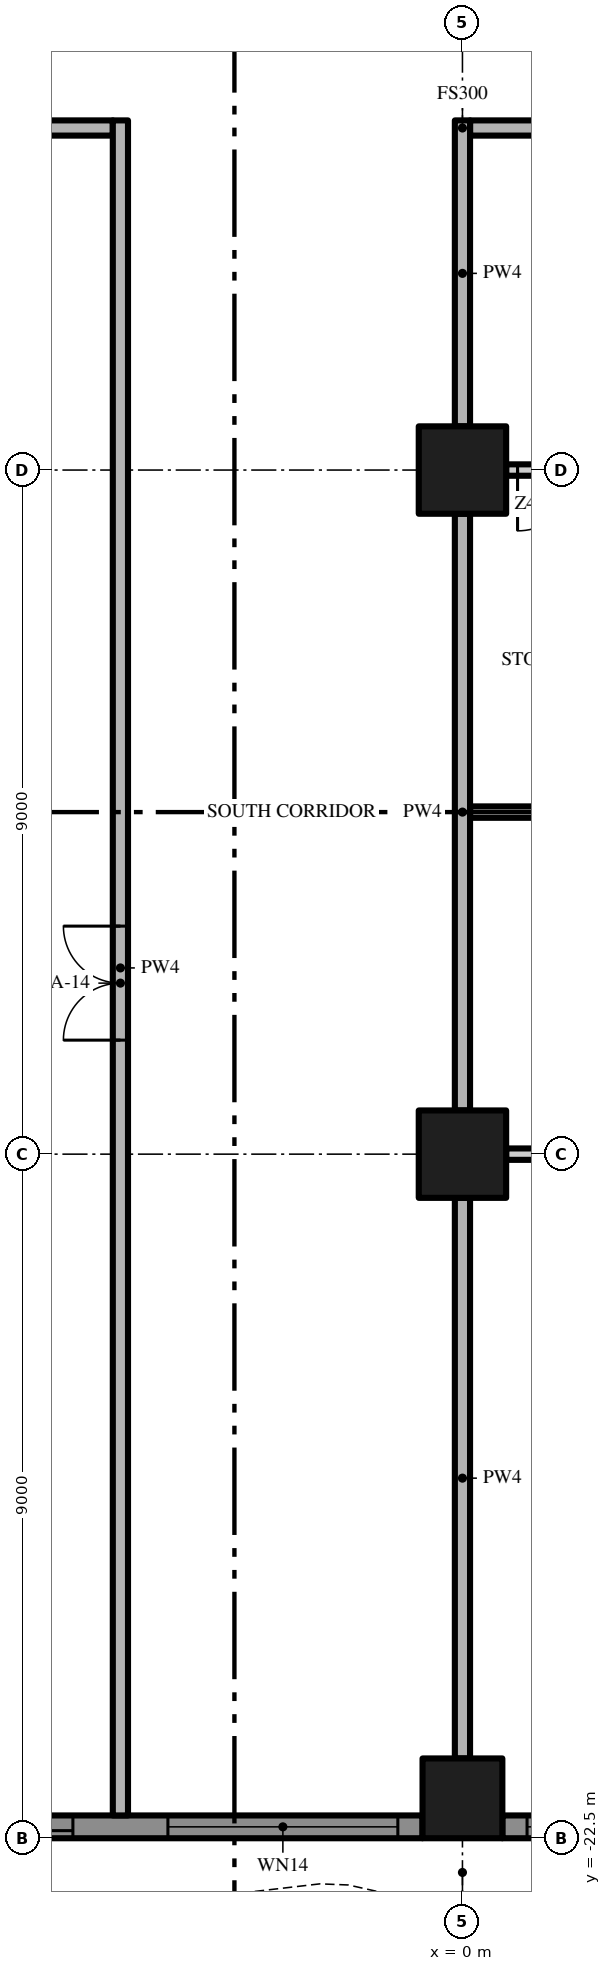
"""IFC4 building model, lengths in metres.
Left out: names, types, materials, properties, quantities, classifications, styles, units other than length and angle.
Written with IfcOpenShell. Run it as: python <this file> out.ifc"""

import sys

from ifc_helpers import new_model, si_unit, direction, frame, frame_2d, origin, origin_2d, place, context, subcontext, project, spatial, polyline, rectangle, outline, extrude, element, fill, save


model = new_model("IFC4")
c1 = context("Model", 3, precision=1e-05, world=origin(), true_north=direction((0.0, 1.0)))
c2 = subcontext(c1, "Body", "Model", "MODEL_VIEW")
j1 = project(units=[si_unit("LENGTHUNIT", "METRE"), si_unit("PLANEANGLEUNIT", "RADIAN")], contexts=[c1])
p1 = place(None, origin())
s1 = spatial("IfcSite", under=j1, at=p1, CompositionType="ELEMENT")
p2 = place(p1, origin())
s2 = spatial("IfcBuilding", under=s1, at=p2, CompositionType="ELEMENT")
p3 = place(p2, frame((0.0, 0.0, 192.0)))
s3 = spatial("IfcBuildingStorey", under=s2, at=p3, CompositionType="ELEMENT", Elevation=192.0)
p4 = place(p3, frame((0.0, -13.5, 0.0), z_axis=(0.0, 0.0, 1.0), x_axis=(1.0, 0.0, 0.0)))
e1 = element("IfcColumn", 1, at=p4, inside=s3, PredefinedType="COLUMN", context=c2, shape_type="SweptSolid", body=[
    extrude(rectangle(XDim=1.15, YDim=1.15, at=origin_2d()), origin(), (0.0, 0.0, 1.0), 3.5),
])
p5 = place(p3, frame((0.0, -21.975, 0.0), z_axis=(0.0, 0.0, 1.0), x_axis=(1.0, 0.0, 0.0)))
e2 = element("IfcColumn", 2, at=p5, inside=s3, PredefinedType="COLUMN", context=c2, shape_type="SweptSolid", body=[
    extrude(rectangle(XDim=1.05, YDim=1.05, at=origin_2d()), origin(), (0.0, 0.0, 1.0), 3.5),
])
p6 = place(p3, frame((0.0, -4.5, 0.0), z_axis=(0.0, 0.0, 1.0), x_axis=(1.0, 0.0, 0.0)))
e3 = element("IfcColumn", 3, at=p6, inside=s3, PredefinedType="COLUMN", context=c2, shape_type="SweptSolid", body=[
    extrude(rectangle(XDim=1.15, YDim=1.15, at=origin_2d()), origin(), (0.0, 0.0, 1.0), 3.5),
])
p7 = place(p3, frame((-0.525, -22.35, 0.0), z_axis=(0.0, 0.0, 1.0), x_axis=(-1.0, 0.0, 0.0)))
e4 = element("IfcWall", 4, at=p7, inside=s3, PredefinedType="SOLIDWALL", context=c2, shape_type="SweptSolid", body=[
    extrude(rectangle(XDim=7.95, YDim=0.3, at=frame_2d((3.975, 0.0))), origin(), (0.0, 0.0, 1.0), 3.5),
])
p8 = place(p7, frame((4.6, 0.0, 0.0)))
e5 = element("IfcOpeningElement", 5, at=p8, cuts=e4, PredefinedType="OPENING", context=c2, shape_type="SweptSolid", body=[
    extrude(rectangle(XDim=3.025, YDim=2.4, at=frame_2d((1.512, 1.2))), frame((0.0, 0.16, 0.0), z_axis=(0.0, -1.0, 0.0), x_axis=(1.0, 0.0, 0.0)), (0.0, 0.0, 1.0), 0.32),
])
p9 = place(p7, frame((0.325, 0.0, 0.45)))
e6 = element("IfcOpeningElement", 6, at=p9, cuts=e4, PredefinedType="OPENING", context=c2, shape_type="SweptSolid", body=[
    extrude(rectangle(XDim=3.025, YDim=2.65, at=frame_2d((1.512, 1.325))), frame((0.0, 0.16, 0.0), z_axis=(0.0, -1.0, 0.0), x_axis=(1.0, 0.0, 0.0)), (0.0, 0.0, 1.0), 0.32),
])
p10 = place(p3, frame((8.475, -22.35, 0.0), z_axis=(0.0, 0.0, 1.0), x_axis=(-1.0, 0.0, 0.0)))
e7 = element("IfcWall", 7, at=p10, inside=s3, PredefinedType="SOLIDWALL", context=c2, shape_type="SweptSolid", body=[
    extrude(rectangle(XDim=7.95, YDim=0.3, at=frame_2d((3.975, 0.0))), origin(), (0.0, 0.0, 1.0), 3.5),
])
p11 = place(p10, frame((4.6, 0.0, 0.45)))
e8 = element("IfcOpeningElement", 8, at=p11, cuts=e7, PredefinedType="OPENING", context=c2, shape_type="SweptSolid", body=[
    extrude(rectangle(XDim=3.025, YDim=2.65, at=frame_2d((1.512, 1.325))), frame((0.0, 0.16, 0.0), z_axis=(0.0, -1.0, 0.0), x_axis=(1.0, 0.0, 0.0)), (0.0, 0.0, 1.0), 0.32),
])
p12 = place(p10, frame((0.325, 0.0, 0.0)))
e9 = element("IfcOpeningElement", 9, at=p12, cuts=e7, PredefinedType="OPENING", context=c2, shape_type="SweptSolid", body=[
    extrude(rectangle(XDim=3.025, YDim=2.4, at=frame_2d((1.512, 1.2))), frame((0.0, 0.16, 0.0), z_axis=(0.0, -1.0, 0.0), x_axis=(1.0, 0.0, 0.0)), (0.0, 0.0, 1.0), 0.32),
])
p13 = place(p3, origin())
e10 = element("IfcWall", 10, at=p13, inside=s3, PredefinedType="USERDEFINED", context=c2, shape_type="SweptSolid", body=[
    extrude(outline(polyline([(-22.5, -25.149), (-21.0, -24.488), (-19.5, -23.755), (-18.0, -23.231), (-16.875, -23.1), (-16.5, -23.115), (-15.0, -23.451), (-13.5, -24.112), (-12.0, -24.845), (-10.5, -25.369), (-9.375, -25.5), (-9.0, -25.485), (-7.5, -25.149), (-6.0, -24.488), (-4.5, -23.755), (-3.0, -23.231), (-1.875, -23.1), (-1.5, -23.115), (0.0, -23.451), (1.5, -24.112), (3.0, -24.845), (4.5, -25.369), (5.625, -25.5), (6.0, -25.485), (7.5, -25.149), (9.0, -24.488), (10.5, -23.755), (12.0, -23.231), (13.125, -23.1), (13.5, -23.115), (15.0, -23.451), (16.5, -24.112), (18.0, -24.845), (19.5, -25.369), (20.625, -25.5), (21.0, -25.485), (22.5, -25.149), (22.445, -24.905), (20.967, -25.236), (20.635, -25.249), (19.556, -25.124), (18.096, -24.614), (16.605, -23.885), (15.079, -23.213), (13.533, -22.866), (13.115, -22.849), (11.944, -22.986), (10.404, -23.524), (8.895, -24.261), (7.421, -24.91), (5.967, -25.236), (5.635, -25.249), (4.556, -25.124), (3.096, -24.614), (1.605, -23.885), (0.079, -23.213), (-1.467, -22.866), (-1.885, -22.849), (-3.056, -22.986), (-4.596, -23.524), (-6.105, -24.261), (-7.579, -24.91), (-9.033, -25.236), (-9.365, -25.249), (-10.444, -25.124), (-11.904, -24.614), (-13.395, -23.885), (-14.921, -23.213), (-16.467, -22.866), (-16.885, -22.849), (-18.056, -22.986), (-19.596, -23.524), (-21.105, -24.261), (-22.601, -24.92), (-22.5, -25.149)])), origin(), (0.0, 0.0, 1.0), 0.9),
])
p14 = place(p3, frame((8.425, -13.5, 0.0), z_axis=(0.0, 0.0, 1.0), x_axis=(-1.0, 0.0, 0.0)))
e11 = element("IfcWall", 11, at=p14, inside=s3, PredefinedType="PARTITIONING", context=c2, shape_type="SweptSolid", body=[
    extrude(rectangle(XDim=7.85, YDim=0.15, at=frame_2d((3.925, 0.0))), origin(), (0.0, 0.0, 1.0), 3.5),
])
p15 = place(p14, frame((4.15, 0.0, 0.0)))
e12 = element("IfcOpeningElement", 12, at=p15, cuts=e11, PredefinedType="OPENING", context=c2, shape_type="SweptSolid", body=[
    extrude(rectangle(XDim=1.8, YDim=2.4, at=frame_2d((0.9, 1.2))), frame((0.0, 0.085, 0.0), z_axis=(0.0, -1.0, 0.0), x_axis=(1.0, 0.0, 0.0)), (0.0, 0.0, 1.0), 0.17),
])
p16 = place(p3, frame((0.1, -9.0, 0.0), z_axis=(0.0, 0.0, 1.0), x_axis=(1.0, 0.0, 0.0)))
e13 = element("IfcWall", 13, at=p16, inside=s3, PredefinedType="PARTITIONING", context=c2, shape_type="SweptSolid", body=[
    extrude(rectangle(XDim=13.4, YDim=0.15, at=frame_2d((6.7, 0.0))), origin(), (0.0, 0.0, 1.0), 3.5),
])
p17 = place(p16, frame((6.9, 0.0, 0.0)))
e14 = element("IfcOpeningElement", 14, at=p17, cuts=e13, PredefinedType="OPENING", context=c2, shape_type="SweptSolid", body=[
    extrude(rectangle(XDim=1.0, YDim=2.4, at=frame_2d((0.5, 1.2))), frame((0.0, 0.085, 0.0), z_axis=(0.0, -1.0, 0.0), x_axis=(1.0, 0.0, 0.0)), (0.0, 0.0, 1.0), 0.17),
])
p18 = place(p3, frame((8.425, -4.5, 0.0), z_axis=(0.0, 0.0, 1.0), x_axis=(-1.0, 0.0, 0.0)))
e15 = element("IfcWall", 15, at=p18, inside=s3, PredefinedType="PARTITIONING", context=c2, shape_type="SweptSolid", body=[
    extrude(rectangle(XDim=7.85, YDim=0.15, at=frame_2d((3.925, 0.0))), origin(), (0.0, 0.0, 1.0), 3.5),
])
p19 = place(p18, frame((6.9, 0.0, 0.0)))
e16 = element("IfcOpeningElement", 16, at=p19, cuts=e15, PredefinedType="OPENING", context=c2, shape_type="SweptSolid", body=[
    extrude(rectangle(XDim=0.8, YDim=2.0, at=frame_2d((0.4, 1.0))), frame((0.0, 0.085, 0.0), z_axis=(0.0, -1.0, 0.0), x_axis=(1.0, 0.0, 0.0)), (0.0, 0.0, 1.0), 0.17),
])
p20 = place(p18, frame((4.875, 0.0, 0.0)))
e17 = element("IfcOpeningElement", 17, at=p20, cuts=e15, PredefinedType="OPENING", context=c2, shape_type="SweptSolid", body=[
    extrude(rectangle(XDim=0.8, YDim=2.0, at=frame_2d((0.4, 1.0))), frame((0.0, 0.085, 0.0), z_axis=(0.0, -1.0, 0.0), x_axis=(1.0, 0.0, 0.0)), (0.0, 0.0, 1.0), 0.17),
])
p21 = place(p3, frame((-17.4, 0.0, 0.0), z_axis=(0.0, 0.0, 1.0), x_axis=(1.0, 0.0, 0.0)))
e18 = element("IfcWall", 18, at=p21, inside=s3, PredefinedType="PARTITIONING", context=c2, shape_type="SweptSolid", body=[
    extrude(rectangle(XDim=12.8, YDim=0.2, at=frame_2d((6.4, 0.0))), origin(), (0.0, 0.0, 1.0), 3.5),
])
p22 = place(p3, frame((17.4, 0.0, 0.0), z_axis=(0.0, 0.0, 1.0), x_axis=(-1.0, 0.0, 0.0)))
e19 = element("IfcWall", 19, at=p22, inside=s3, PredefinedType="PARTITIONING", context=c2, shape_type="SweptSolid", body=[
    extrude(rectangle(XDim=17.3, YDim=0.2, at=frame_2d((8.65, 0.0))), origin(), (0.0, 0.0, 1.0), 3.5),
])
p23 = place(p22, frame((7.65, 0.0, 0.0)))
e20 = element("IfcOpeningElement", 20, at=p23, cuts=e19, PredefinedType="OPENING", context=c2, shape_type="SweptSolid", body=[
    extrude(rectangle(XDim=1.5, YDim=2.4, at=frame_2d((0.75, 1.2))), frame((0.0, 0.11, 0.0), z_axis=(0.0, -1.0, 0.0), x_axis=(1.0, 0.0, 0.0)), (0.0, 0.0, 1.0), 0.22),
])
p24 = place(p3, frame((-4.5, -22.2, 0.0), z_axis=(0.0, 0.0, 1.0), x_axis=(0.0, 1.0, 0.0)))
e21 = element("IfcWall", 21, at=p24, inside=s3, PredefinedType="PARTITIONING", context=c2, shape_type="SweptSolid", body=[
    extrude(rectangle(XDim=22.3, YDim=0.2, at=frame_2d((11.15, 0.0))), origin(), (0.0, 0.0, 1.0), 3.5),
])
p25 = place(p24, frame((10.2, 0.0, 0.0)))
e22 = element("IfcOpeningElement", 22, at=p25, cuts=e21, PredefinedType="OPENING", context=c2, shape_type="SweptSolid", body=[
    extrude(rectangle(XDim=1.5, YDim=2.4, at=frame_2d((0.75, 1.2))), frame((0.0, 0.11, 0.0), z_axis=(0.0, -1.0, 0.0), x_axis=(1.0, 0.0, 0.0)), (0.0, 0.0, 1.0), 0.22),
])
p26 = place(p3, frame((0.0, -21.45, 0.0), z_axis=(0.0, 0.0, 1.0), x_axis=(0.0, 1.0, 0.0)))
e23 = element("IfcWall", 23, at=p26, inside=s3, PredefinedType="PARTITIONING", context=c2, shape_type="SweptSolid", body=[
    extrude(rectangle(XDim=7.375, YDim=0.2, at=frame_2d((3.688, 0.0))), origin(), (0.0, 0.0, 1.0), 3.5),
])
p27 = place(p3, frame((0.0, -12.925, 0.0), z_axis=(0.0, 0.0, 1.0), x_axis=(0.0, 1.0, 0.0)))
e24 = element("IfcWall", 24, at=p27, inside=s3, PredefinedType="PARTITIONING", context=c2, shape_type="SweptSolid", body=[
    extrude(rectangle(XDim=7.85, YDim=0.2, at=frame_2d((3.925, 0.0))), origin(), (0.0, 0.0, 1.0), 3.5),
])
p28 = place(p3, frame((0.0, -3.925, 0.0), z_axis=(0.0, 0.0, 1.0), x_axis=(0.0, 1.0, 0.0)))
e25 = element("IfcWall", 25, at=p28, inside=s3, PredefinedType="PARTITIONING", context=c2, shape_type="SweptSolid", body=[
    extrude(rectangle(XDim=4.025, YDim=0.2, at=frame_2d((2.013, 0.0))), origin(), (0.0, 0.0, 1.0), 3.5),
])
p29 = place(p8, origin())
e26 = element("IfcDoor", 26, at=p29, inside=s3, OperationType="SINGLE_SWING_LEFT", PredefinedType="DOOR", context=c2, shape_type="SweptSolid", body=[
    extrude(rectangle(XDim=3.025, YDim=2.4, at=frame_2d((1.512, 1.2))), frame((0.0, 0.025, 0.0), z_axis=(0.0, -1.0, 0.0), x_axis=(1.0, 0.0, 0.0)), (0.0, 0.0, 1.0), 0.05),
])
fill(e5, e26)
p30 = place(p9, origin())
e27 = element("IfcWindow", 27, at=p30, inside=s3, PartitioningType="SINGLE_PANEL", PredefinedType="WINDOW", context=c2, shape_type="SweptSolid", body=[
    extrude(rectangle(XDim=3.025, YDim=2.65, at=frame_2d((1.512, 1.325))), frame((0.0, 0.03, 0.0), z_axis=(0.0, -1.0, 0.0), x_axis=(1.0, 0.0, 0.0)), (0.0, 0.0, 1.0), 0.06),
])
fill(e6, e27)
p31 = place(p11, origin())
e28 = element("IfcWindow", 28, at=p31, inside=s3, PartitioningType="SINGLE_PANEL", PredefinedType="WINDOW", context=c2, shape_type="SweptSolid", body=[
    extrude(rectangle(XDim=3.025, YDim=2.65, at=frame_2d((1.512, 1.325))), frame((0.0, 0.03, 0.0), z_axis=(0.0, -1.0, 0.0), x_axis=(1.0, 0.0, 0.0)), (0.0, 0.0, 1.0), 0.06),
])
fill(e8, e28)
p32 = place(p25, origin())
e29 = element("IfcDoor", 29, at=p32, inside=s3, OperationType="DOUBLE_DOOR_SINGLE_SWING", PredefinedType="DOOR", context=c2, shape_type="SweptSolid", body=[
    extrude(rectangle(XDim=1.5, YDim=2.4, at=frame_2d((0.75, 1.2))), frame((0.0, 0.025, 0.0), z_axis=(0.0, -1.0, 0.0), x_axis=(1.0, 0.0, 0.0)), (0.0, 0.0, 1.0), 0.05),
])
fill(e22, e29)
p33 = place(p19, origin())
e30 = element("IfcDoor", 30, at=p33, inside=s3, OperationType="SINGLE_SWING_RIGHT", PredefinedType="DOOR", context=c2, shape_type="SweptSolid", body=[
    extrude(rectangle(XDim=0.8, YDim=2.0, at=frame_2d((0.4, 1.0))), frame((0.0, 0.025, 0.0), z_axis=(0.0, -1.0, 0.0), x_axis=(1.0, 0.0, 0.0)), (0.0, 0.0, 1.0), 0.05),
])
fill(e16, e30)
save(model, sys.argv[1])
